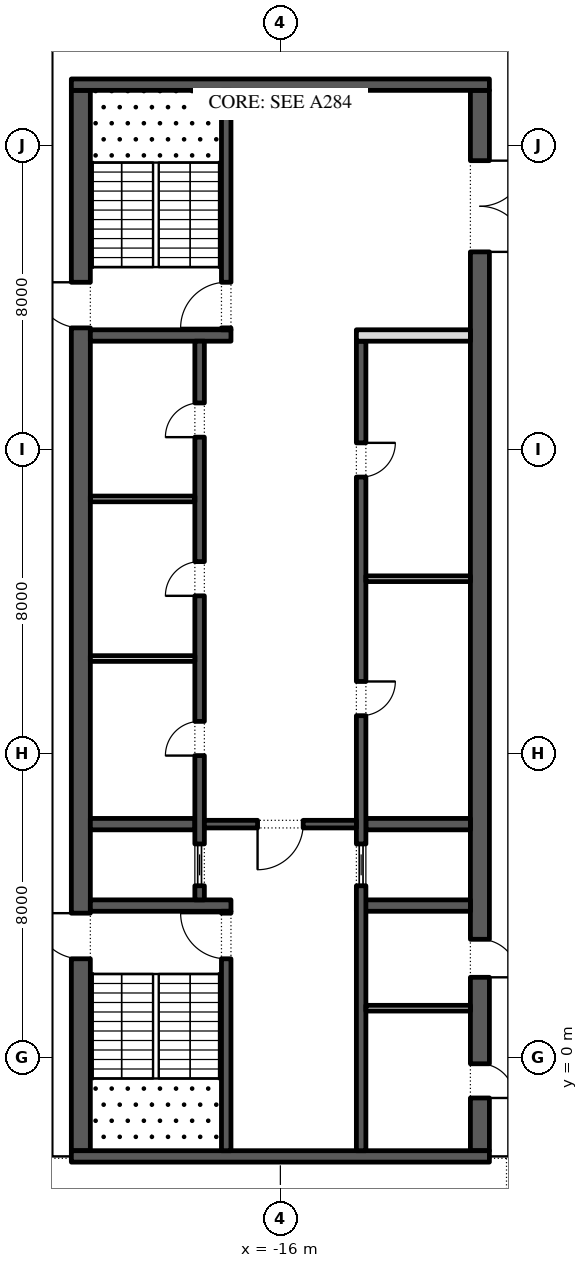
"""IFC4 building model, lengths in metres.
Left out: names, types, materials, properties, quantities, classifications, styles, units other than length and angle.
Written with IfcOpenShell. Run it as: python <this file> out.ifc"""

import sys

from ifc_helpers import new_model, si_unit, direction, frame, frame_2d, origin, place, context, subcontext, project, spatial, rectangle, extrude, element, fill, save


model = new_model("IFC4")
c1 = context("Model", 3, precision=1e-05, world=origin(), true_north=direction((0.0, 1.0)))
c2 = subcontext(c1, "Body", "Model", "MODEL_VIEW")
j1 = project(units=[si_unit("LENGTHUNIT", "METRE"), si_unit("PLANEANGLEUNIT", "RADIAN")], contexts=[c1])
p1 = place(None, origin())
s1 = spatial("IfcSite", under=j1, at=p1, CompositionType="ELEMENT")
p2 = place(p1, origin())
s2 = spatial("IfcBuilding", under=s1, at=p2, CompositionType="ELEMENT")
p3 = place(p2, frame((0.0, 0.0, 369.0)))
s3 = spatial("IfcBuildingStorey", under=s2, at=p3, CompositionType="ELEMENT", Elevation=369.0)
p4 = place(p3, frame((-21.25, -2.45, 0.0), z_axis=(0.0, 0.0, 1.0), x_axis=(0.0, 1.0, 0.0)))
e1 = element("IfcWall", 1, at=p4, inside=s3, PredefinedType="SHEAR", context=c2, shape_type="SweptSolid", body=[
    extrude(rectangle(XDim=27.9, YDim=0.5, at=frame_2d((13.95, 0.0))), origin(), (0.0, 0.0, 1.0), 4.0),
])
p5 = place(p4, frame((5.05, 0.0, 0.0)))
e2 = element("IfcOpeningElement", 2, at=p5, cuts=e1, PredefinedType="OPENING", context=c2, shape_type="SweptSolid", body=[
    extrude(rectangle(XDim=1.2, YDim=2.1, at=frame_2d((0.6, 1.05))), frame((0.0, 0.26, 0.0), z_axis=(0.0, -1.0, 0.0), x_axis=(1.0, 0.0, 0.0)), (0.0, 0.0, 1.0), 0.52),
])
p6 = place(p4, frame((21.65, 0.0, 0.0)))
e3 = element("IfcOpeningElement", 3, at=p6, cuts=e1, PredefinedType="OPENING", context=c2, shape_type="SweptSolid", body=[
    extrude(rectangle(XDim=1.2, YDim=2.1, at=frame_2d((0.6, 1.05))), frame((0.0, 0.26, 0.0), z_axis=(0.0, -1.0, 0.0), x_axis=(1.0, 0.0, 0.0)), (0.0, 0.0, 1.0), 0.52),
])
p7 = place(p3, frame((-10.75, -2.45, 0.0), z_axis=(0.0, 0.0, 1.0), x_axis=(0.0, 1.0, 0.0)))
e4 = element("IfcWall", 4, at=p7, inside=s3, PredefinedType="SHEAR", context=c2, shape_type="SweptSolid", body=[
    extrude(rectangle(XDim=27.9, YDim=0.5, at=frame_2d((13.95, 0.0))), origin(), (0.0, 0.0, 1.0), 4.0),
])
p8 = place(p7, frame((23.65, 0.0, 0.0)))
e5 = element("IfcOpeningElement", 5, at=p8, cuts=e4, PredefinedType="OPENING", context=c2, shape_type="SweptSolid", body=[
    extrude(rectangle(XDim=2.4, YDim=2.1, at=frame_2d((1.2, 1.05))), frame((0.0, 0.26, 0.0), z_axis=(0.0, -1.0, 0.0), x_axis=(1.0, 0.0, 0.0)), (0.0, 0.0, 1.0), 0.52),
])
p9 = place(p7, frame((1.387, 0.0, 0.0)))
e6 = element("IfcOpeningElement", 6, at=p9, cuts=e4, PredefinedType="OPENING", context=c2, shape_type="SweptSolid", body=[
    extrude(rectangle(XDim=0.9, YDim=2.1, at=frame_2d((0.45, 1.05))), frame((0.0, 0.26, 0.0), z_axis=(0.0, -1.0, 0.0), x_axis=(1.0, 0.0, 0.0)), (0.0, 0.0, 1.0), 0.52),
])
p10 = place(p7, frame((4.562, 0.0, 0.0)))
e7 = element("IfcOpeningElement", 7, at=p10, cuts=e4, PredefinedType="OPENING", context=c2, shape_type="SweptSolid", body=[
    extrude(rectangle(XDim=1.0, YDim=2.1, at=frame_2d((0.5, 1.05))), frame((0.0, 0.26, 0.0), z_axis=(0.0, -1.0, 0.0), x_axis=(1.0, 0.0, 0.0)), (0.0, 0.0, 1.0), 0.52),
])
for number, where, z_axis, x_axis in (
    (8, (-21.5, -2.6, 0.0), (0.0, 0.0, 1.0), (1.0, 0.0, 0.0)),
    (9, (-21.5, 25.6, 0.0), (0.0, 0.0, 1.0), (1.0, 0.0, 0.0)),
):
    element("IfcWall", number, at=place(p3, frame(where, z_axis=z_axis, x_axis=x_axis)), inside=s3, PredefinedType="SHEAR", context=c2, shape_type="SweptSolid", body=[
        extrude(rectangle(XDim=11.0, YDim=0.3, at=frame_2d((5.5, 0.0))), origin(), (0.0, 0.0, 1.0), 4.0),
    ])
p11 = place(p3, frame((-21.0, 4.0, 0.0), z_axis=(0.0, 0.0, 1.0), x_axis=(1.0, 0.0, 0.0)))
e10 = element("IfcWall", 10, at=p11, inside=s3, PredefinedType="SHEAR", context=c2, shape_type="SweptSolid", body=[
    extrude(rectangle(XDim=3.7, YDim=0.3, at=frame_2d((1.85, 0.0))), origin(), (0.0, 0.0, 1.0), 4.0),
])
p12 = place(p3, frame((-17.425, -2.45, 0.0), z_axis=(0.0, 0.0, 1.0), x_axis=(0.0, 1.0, 0.0)))
e11 = element("IfcWall", 11, at=p12, inside=s3, PredefinedType="SHEAR", context=c2, shape_type="SweptSolid", body=[
    extrude(rectangle(XDim=6.3, YDim=0.25, at=frame_2d((3.15, 0.0))), origin(), (0.0, 0.0, 1.0), 4.0),
])
p13 = place(p12, frame((5.05, 0.0, 0.0)))
e12 = element("IfcOpeningElement", 12, at=p13, cuts=e11, PredefinedType="OPENING", context=c2, shape_type="SweptSolid", body=[
    extrude(rectangle(XDim=1.2, YDim=2.1, at=frame_2d((0.6, 1.05))), frame((0.0, 0.135, 0.0), z_axis=(0.0, -1.0, 0.0), x_axis=(1.0, 0.0, 0.0)), (0.0, 0.0, 1.0), 0.27),
])
p14 = place(p3, frame((-21.0, 19.0, 0.0), z_axis=(0.0, 0.0, 1.0), x_axis=(1.0, 0.0, 0.0)))
e13 = element("IfcWall", 13, at=p14, inside=s3, PredefinedType="SHEAR", context=c2, shape_type="SweptSolid", body=[
    extrude(rectangle(XDim=3.7, YDim=0.3, at=frame_2d((1.85, 0.0))), origin(), (0.0, 0.0, 1.0), 4.0),
])
p15 = place(p3, frame((-17.425, 19.15, 0.0), z_axis=(0.0, 0.0, 1.0), x_axis=(0.0, 1.0, 0.0)))
e14 = element("IfcWall", 14, at=p15, inside=s3, PredefinedType="SHEAR", context=c2, shape_type="SweptSolid", body=[
    extrude(rectangle(XDim=6.3, YDim=0.25, at=frame_2d((3.15, 0.0))), origin(), (0.0, 0.0, 1.0), 4.0),
])
p16 = place(p15, frame((0.05, 0.0, 0.0)))
e15 = element("IfcOpeningElement", 15, at=p16, cuts=e14, PredefinedType="OPENING", context=c2, shape_type="SweptSolid", body=[
    extrude(rectangle(XDim=1.2, YDim=2.1, at=frame_2d((0.6, 1.05))), frame((0.0, 0.135, 0.0), z_axis=(0.0, -1.0, 0.0), x_axis=(1.0, 0.0, 0.0)), (0.0, 0.0, 1.0), 0.27),
])
p17 = place(p3, frame((-21.0, 6.143, 0.0), z_axis=(0.0, 0.0, 1.0), x_axis=(1.0, 0.0, 0.0)))
e16 = element("IfcWall", 16, at=p17, inside=s3, PredefinedType="SHEAR", context=c2, shape_type="SweptSolid", body=[
    extrude(rectangle(XDim=2.75, YDim=0.3, at=frame_2d((1.375, 0.0))), origin(), (0.0, 0.0, 1.0), 4.0),
])
p18 = place(p3, frame((-18.125, 4.15, 0.0), z_axis=(0.0, 0.0, 1.0), x_axis=(0.0, 1.0, 0.0)))
e17 = element("IfcWall", 17, at=p18, inside=s3, PredefinedType="SHEAR", context=c2, shape_type="SweptSolid", body=[
    extrude(rectangle(XDim=14.7, YDim=0.25, at=frame_2d((7.35, 0.0))), origin(), (0.0, 0.0, 1.0), 4.0),
])
p19 = place(p18, frame((3.796, 0.0, 0.0)))
e18 = element("IfcOpeningElement", 18, at=p19, cuts=e17, PredefinedType="OPENING", context=c2, shape_type="SweptSolid", body=[
    extrude(rectangle(XDim=0.9, YDim=2.1, at=frame_2d((0.45, 1.05))), frame((0.0, 0.135, 0.0), z_axis=(0.0, -1.0, 0.0), x_axis=(1.0, 0.0, 0.0)), (0.0, 0.0, 1.0), 0.27),
])
p20 = place(p18, frame((8.0, 0.0, 0.0)))
e19 = element("IfcOpeningElement", 19, at=p20, cuts=e17, PredefinedType="OPENING", context=c2, shape_type="SweptSolid", body=[
    extrude(rectangle(XDim=0.9, YDim=2.1, at=frame_2d((0.45, 1.05))), frame((0.0, 0.135, 0.0), z_axis=(0.0, -1.0, 0.0), x_axis=(1.0, 0.0, 0.0)), (0.0, 0.0, 1.0), 0.27),
])
p21 = place(p18, frame((12.175, 0.0, 0.0)))
e20 = element("IfcOpeningElement", 20, at=p21, cuts=e17, PredefinedType="OPENING", context=c2, shape_type="SweptSolid", body=[
    extrude(rectangle(XDim=0.9, YDim=2.1, at=frame_2d((0.45, 1.05))), frame((0.0, 0.135, 0.0), z_axis=(0.0, -1.0, 0.0), x_axis=(1.0, 0.0, 0.0)), (0.0, 0.0, 1.0), 0.27),
])
p22 = place(p18, frame((0.371, 0.0, 0.0)))
e21 = element("IfcOpeningElement", 21, at=p22, cuts=e17, PredefinedType="OPENING", context=c2, shape_type="SweptSolid", body=[
    extrude(rectangle(XDim=1.1, YDim=2.1, at=frame_2d((0.55, 1.05))), frame((0.0, 0.135, 0.0), z_axis=(0.0, -1.0, 0.0), x_axis=(1.0, 0.0, 0.0)), (0.0, 0.0, 1.0), 0.27),
])
for number, where, z_axis, x_axis in (
    (22, (-21.0, 10.5, 0.0), (0.0, 0.0, 1.0), (1.0, 0.0, 0.0)),
    (23, (-21.0, 14.7, 0.0), (0.0, 0.0, 1.0), (1.0, 0.0, 0.0)),
):
    element("IfcWall", number, at=place(p3, frame(where, z_axis=z_axis, x_axis=x_axis)), inside=s3, PredefinedType="PARTITIONING", context=c2, shape_type="SweptSolid", body=[
        extrude(rectangle(XDim=2.75, YDim=0.15, at=frame_2d((1.375, 0.0))), origin(), (0.0, 0.0, 1.0), 4.0),
    ])
p23 = place(p3, frame((-14.0, 4.0, 0.0), z_axis=(0.0, 0.0, 1.0), x_axis=(1.0, 0.0, 0.0)))
e24 = element("IfcWall", 24, at=p23, inside=s3, PredefinedType="SHEAR", context=c2, shape_type="SweptSolid", body=[
    extrude(rectangle(XDim=3.0, YDim=0.3, at=frame_2d((1.5, 0.0))), origin(), (0.0, 0.0, 1.0), 4.0),
])
p24 = place(p3, frame((-13.75, 6.143, 0.0), z_axis=(0.0, 0.0, 1.0), x_axis=(1.0, 0.0, 0.0)))
e25 = element("IfcWall", 25, at=p24, inside=s3, PredefinedType="SHEAR", context=c2, shape_type="SweptSolid", body=[
    extrude(rectangle(XDim=2.75, YDim=0.3, at=frame_2d((1.375, 0.0))), origin(), (0.0, 0.0, 1.0), 4.0),
])
p25 = place(p3, frame((-13.875, -2.45, 0.0), z_axis=(0.0, 0.0, 1.0), x_axis=(0.0, 1.0, 0.0)))
e26 = element("IfcWall", 26, at=p25, inside=s3, PredefinedType="SHEAR", context=c2, shape_type="SweptSolid", body=[
    extrude(rectangle(XDim=21.3, YDim=0.25, at=frame_2d((10.65, 0.0))), origin(), (0.0, 0.0, 1.0), 4.0),
])
p26 = place(p25, frame((11.446, 0.0, 0.0)))
e27 = element("IfcOpeningElement", 27, at=p26, cuts=e26, PredefinedType="OPENING", context=c2, shape_type="SweptSolid", body=[
    extrude(rectangle(XDim=0.9, YDim=2.1, at=frame_2d((0.45, 1.05))), frame((0.0, 0.135, 0.0), z_axis=(0.0, -1.0, 0.0), x_axis=(1.0, 0.0, 0.0)), (0.0, 0.0, 1.0), 0.27),
])
p27 = place(p25, frame((17.725, 0.0, 0.0)))
e28 = element("IfcOpeningElement", 28, at=p27, cuts=e26, PredefinedType="OPENING", context=c2, shape_type="SweptSolid", body=[
    extrude(rectangle(XDim=0.9, YDim=2.1, at=frame_2d((0.45, 1.05))), frame((0.0, 0.135, 0.0), z_axis=(0.0, -1.0, 0.0), x_axis=(1.0, 0.0, 0.0)), (0.0, 0.0, 1.0), 0.27),
])
p28 = place(p25, frame((6.971, 0.0, 0.0)))
e29 = element("IfcOpeningElement", 29, at=p28, cuts=e26, PredefinedType="OPENING", context=c2, shape_type="SweptSolid", body=[
    extrude(rectangle(XDim=1.1, YDim=2.1, at=frame_2d((0.55, 1.05))), frame((0.0, 0.135, 0.0), z_axis=(0.0, -1.0, 0.0), x_axis=(1.0, 0.0, 0.0)), (0.0, 0.0, 1.0), 0.27),
])
p29 = place(p3, frame((-14.0, 19.0, 0.0), z_axis=(0.0, 0.0, 1.0), x_axis=(1.0, 0.0, 0.0)))
e30 = element("IfcWall", 30, at=p29, inside=s3, PredefinedType="PARTITIONING", context=c2, shape_type="SweptSolid", body=[
    extrude(rectangle(XDim=3.0, YDim=0.3, at=frame_2d((1.5, 0.0))), origin(), (0.0, 0.0, 1.0), 4.0),
])
p30 = place(p3, frame((-13.75, 12.6, 0.0), z_axis=(0.0, 0.0, 1.0), x_axis=(1.0, 0.0, 0.0)))
e31 = element("IfcWall", 31, at=p30, inside=s3, PredefinedType="PARTITIONING", context=c2, shape_type="SweptSolid", body=[
    extrude(rectangle(XDim=2.75, YDim=0.15, at=frame_2d((1.375, 0.0))), origin(), (0.0, 0.0, 1.0), 4.0),
])
p31 = place(p3, frame((-18.0, 6.143, 0.0), z_axis=(0.0, 0.0, 1.0), x_axis=(1.0, 0.0, 0.0)))
e32 = element("IfcWall", 32, at=p31, inside=s3, PredefinedType="SHEAR", context=c2, shape_type="SweptSolid", body=[
    extrude(rectangle(XDim=4.0, YDim=0.2, at=frame_2d((2.0, 0.0))), origin(), (0.0, 0.0, 1.0), 4.0),
])
p32 = place(p31, frame((1.4, 0.0, 0.0)))
e33 = element("IfcOpeningElement", 33, at=p32, cuts=e32, PredefinedType="OPENING", context=c2, shape_type="SweptSolid", body=[
    extrude(rectangle(XDim=1.2, YDim=2.1, at=frame_2d((0.6, 1.05))), frame((0.0, 0.11, 0.0), z_axis=(0.0, -1.0, 0.0), x_axis=(1.0, 0.0, 0.0)), (0.0, 0.0, 1.0), 0.22),
])
p33 = place(p3, frame((-13.75, 1.3, 0.0), z_axis=(0.0, 0.0, 1.0), x_axis=(1.0, 0.0, 0.0)))
e34 = element("IfcWall", 34, at=p33, inside=s3, PredefinedType="PARTITIONING", context=c2, shape_type="SweptSolid", body=[
    extrude(rectangle(XDim=2.75, YDim=0.15, at=frame_2d((1.375, 0.0))), origin(), (0.0, 0.0, 1.0), 4.0),
])
p34 = place(p19, origin())
e35 = element("IfcDoor", 35, at=p34, inside=s3, OperationType="SINGLE_SWING_RIGHT", PredefinedType="DOOR", context=c2, shape_type="SweptSolid", body=[
    extrude(rectangle(XDim=0.9, YDim=2.1, at=frame_2d((0.45, 1.05))), frame((0.0, 0.125, 0.0), z_axis=(0.0, -1.0, 0.0), x_axis=(1.0, 0.0, 0.0)), (0.0, 0.0, 1.0), 0.05),
])
fill(e18, e35)
p35 = place(p20, origin())
e36 = element("IfcDoor", 36, at=p35, inside=s3, OperationType="SINGLE_SWING_RIGHT", PredefinedType="DOOR", context=c2, shape_type="SweptSolid", body=[
    extrude(rectangle(XDim=0.9, YDim=2.1, at=frame_2d((0.45, 1.05))), frame((0.0, 0.125, 0.0), z_axis=(0.0, -1.0, 0.0), x_axis=(1.0, 0.0, 0.0)), (0.0, 0.0, 1.0), 0.05),
])
fill(e19, e36)
p36 = place(p21, origin())
e37 = element("IfcDoor", 37, at=p36, inside=s3, OperationType="SINGLE_SWING_RIGHT", PredefinedType="DOOR", context=c2, shape_type="SweptSolid", body=[
    extrude(rectangle(XDim=0.9, YDim=2.1, at=frame_2d((0.45, 1.05))), frame((0.0, 0.125, 0.0), z_axis=(0.0, -1.0, 0.0), x_axis=(1.0, 0.0, 0.0)), (0.0, 0.0, 1.0), 0.05),
])
fill(e20, e37)
p37 = place(p22, origin())
e38 = element("IfcDoor", 38, at=p37, inside=s3, OperationType="SLIDING_TO_LEFT", PredefinedType="DOOR", context=c2, shape_type="SweptSolid", body=[
    extrude(rectangle(XDim=1.1, YDim=2.1, at=frame_2d((0.55, 1.05))), frame((0.0, 0.025, 0.0), z_axis=(0.0, -1.0, 0.0), x_axis=(1.0, 0.0, 0.0)), (0.0, 0.0, 1.0), 0.05),
])
fill(e21, e38)
p38 = place(p26, frame((0.9, -0.2, 0.0), z_axis=(0.0, 0.0, 1.0), x_axis=(-1.0, 0.0, 0.0)))
e39 = element("IfcDoor", 39, at=p38, inside=s3, OperationType="SINGLE_SWING_RIGHT", PredefinedType="DOOR", context=c2, shape_type="SweptSolid", body=[
    extrude(rectangle(XDim=0.9, YDim=2.1, at=frame_2d((0.45, 1.05))), frame((0.0, -0.075, 0.0), z_axis=(0.0, -1.0, 0.0), x_axis=(1.0, 0.0, 0.0)), (0.0, 0.0, 1.0), 0.05),
])
fill(e27, e39)
p39 = place(p27, frame((0.9, -0.2, 0.0), z_axis=(0.0, 0.0, 1.0), x_axis=(-1.0, 0.0, 0.0)))
e40 = element("IfcDoor", 40, at=p39, inside=s3, OperationType="SINGLE_SWING_RIGHT", PredefinedType="DOOR", context=c2, shape_type="SweptSolid", body=[
    extrude(rectangle(XDim=0.9, YDim=2.1, at=frame_2d((0.45, 1.05))), frame((0.0, -0.075, 0.0), z_axis=(0.0, -1.0, 0.0), x_axis=(1.0, 0.0, 0.0)), (0.0, 0.0, 1.0), 0.05),
])
fill(e28, e40)
p40 = place(p28, origin())
e41 = element("IfcDoor", 41, at=p40, inside=s3, OperationType="SLIDING_TO_LEFT", PredefinedType="DOOR", context=c2, shape_type="SweptSolid", body=[
    extrude(rectangle(XDim=1.1, YDim=2.1, at=frame_2d((0.55, 1.05))), frame((0.0, 0.025, 0.0), z_axis=(0.0, -1.0, 0.0), x_axis=(1.0, 0.0, 0.0)), (0.0, 0.0, 1.0), 0.05),
])
fill(e29, e41)
p41 = place(p32, frame((1.2, 0.0, 0.0), z_axis=(0.0, 0.0, 1.0), x_axis=(-1.0, 0.0, 0.0)))
e42 = element("IfcDoor", 42, at=p41, inside=s3, OperationType="SINGLE_SWING_LEFT", PredefinedType="DOOR", context=c2, shape_type="SweptSolid", body=[
    extrude(rectangle(XDim=1.2, YDim=2.1, at=frame_2d((0.6, 1.05))), frame((0.0, 0.025, 0.0), z_axis=(0.0, -1.0, 0.0), x_axis=(1.0, 0.0, 0.0)), (0.0, 0.0, 1.0), 0.05),
])
fill(e33, e42)
p42 = place(p8, frame((2.4, 0.0, 0.0), z_axis=(0.0, 0.0, 1.0), x_axis=(-1.0, 0.0, 0.0)))
e43 = element("IfcDoor", 43, at=p42, inside=s3, OperationType="DOUBLE_DOOR_SINGLE_SWING", PredefinedType="DOOR", context=c2, shape_type="SweptSolid", body=[
    extrude(rectangle(XDim=2.4, YDim=2.1, at=frame_2d((1.2, 1.05))), frame((0.0, 0.025, 0.0), z_axis=(0.0, -1.0, 0.0), x_axis=(1.0, 0.0, 0.0)), (0.0, 0.0, 1.0), 0.05),
])
fill(e5, e43)
p43 = place(p13, origin())
e44 = element("IfcDoor", 44, at=p43, inside=s3, OperationType="SINGLE_SWING_LEFT", PredefinedType="DOOR", context=c2, shape_type="SweptSolid", body=[
    extrude(rectangle(XDim=1.2, YDim=2.1, at=frame_2d((0.6, 1.05))), frame((0.0, 0.025, 0.0), z_axis=(0.0, -1.0, 0.0), x_axis=(1.0, 0.0, 0.0)), (0.0, 0.0, 1.0), 0.05),
])
fill(e12, e44)
p44 = place(p5, origin())
e45 = element("IfcDoor", 45, at=p44, inside=s3, OperationType="SINGLE_SWING_LEFT", PredefinedType="DOOR", context=c2, shape_type="SweptSolid", body=[
    extrude(rectangle(XDim=1.2, YDim=2.1, at=frame_2d((0.6, 1.05))), frame((0.0, 0.025, 0.0), z_axis=(0.0, -1.0, 0.0), x_axis=(1.0, 0.0, 0.0)), (0.0, 0.0, 1.0), 0.05),
])
fill(e2, e45)
p45 = place(p16, origin())
e46 = element("IfcDoor", 46, at=p45, inside=s3, OperationType="SINGLE_SWING_RIGHT", PredefinedType="DOOR", context=c2, shape_type="SweptSolid", body=[
    extrude(rectangle(XDim=1.2, YDim=2.1, at=frame_2d((0.6, 1.05))), frame((0.0, 0.025, 0.0), z_axis=(0.0, -1.0, 0.0), x_axis=(1.0, 0.0, 0.0)), (0.0, 0.0, 1.0), 0.05),
])
fill(e15, e46)
p46 = place(p6, origin())
e47 = element("IfcDoor", 47, at=p46, inside=s3, OperationType="SINGLE_SWING_LEFT", PredefinedType="DOOR", context=c2, shape_type="SweptSolid", body=[
    extrude(rectangle(XDim=1.2, YDim=2.1, at=frame_2d((0.6, 1.05))), frame((0.0, 0.025, 0.0), z_axis=(0.0, -1.0, 0.0), x_axis=(1.0, 0.0, 0.0)), (0.0, 0.0, 1.0), 0.05),
])
fill(e3, e47)
p47 = place(p9, frame((0.9, 0.45, 0.0), z_axis=(0.0, 0.0, 1.0), x_axis=(-1.0, 0.0, 0.0)))
e48 = element("IfcDoor", 48, at=p47, inside=s3, OperationType="SINGLE_SWING_LEFT", PredefinedType="DOOR", context=c2, shape_type="SweptSolid", body=[
    extrude(rectangle(XDim=0.9, YDim=2.1, at=frame_2d((0.45, 1.05))), frame((0.0, 0.25, 0.0), z_axis=(0.0, -1.0, 0.0), x_axis=(1.0, 0.0, 0.0)), (0.0, 0.0, 1.0), 0.05),
])
fill(e6, e48)
p48 = place(p10, frame((1.0, 0.45, 0.0), z_axis=(0.0, 0.0, 1.0), x_axis=(-1.0, 0.0, 0.0)))
e49 = element("IfcDoor", 49, at=p48, inside=s3, OperationType="SINGLE_SWING_LEFT", PredefinedType="DOOR", context=c2, shape_type="SweptSolid", body=[
    extrude(rectangle(XDim=1.0, YDim=2.1, at=frame_2d((0.5, 1.05))), frame((0.0, 0.25, 0.0), z_axis=(0.0, -1.0, 0.0), x_axis=(1.0, 0.0, 0.0)), (0.0, 0.0, 1.0), 0.05),
])
fill(e7, e49)
save(model, sys.argv[1])
